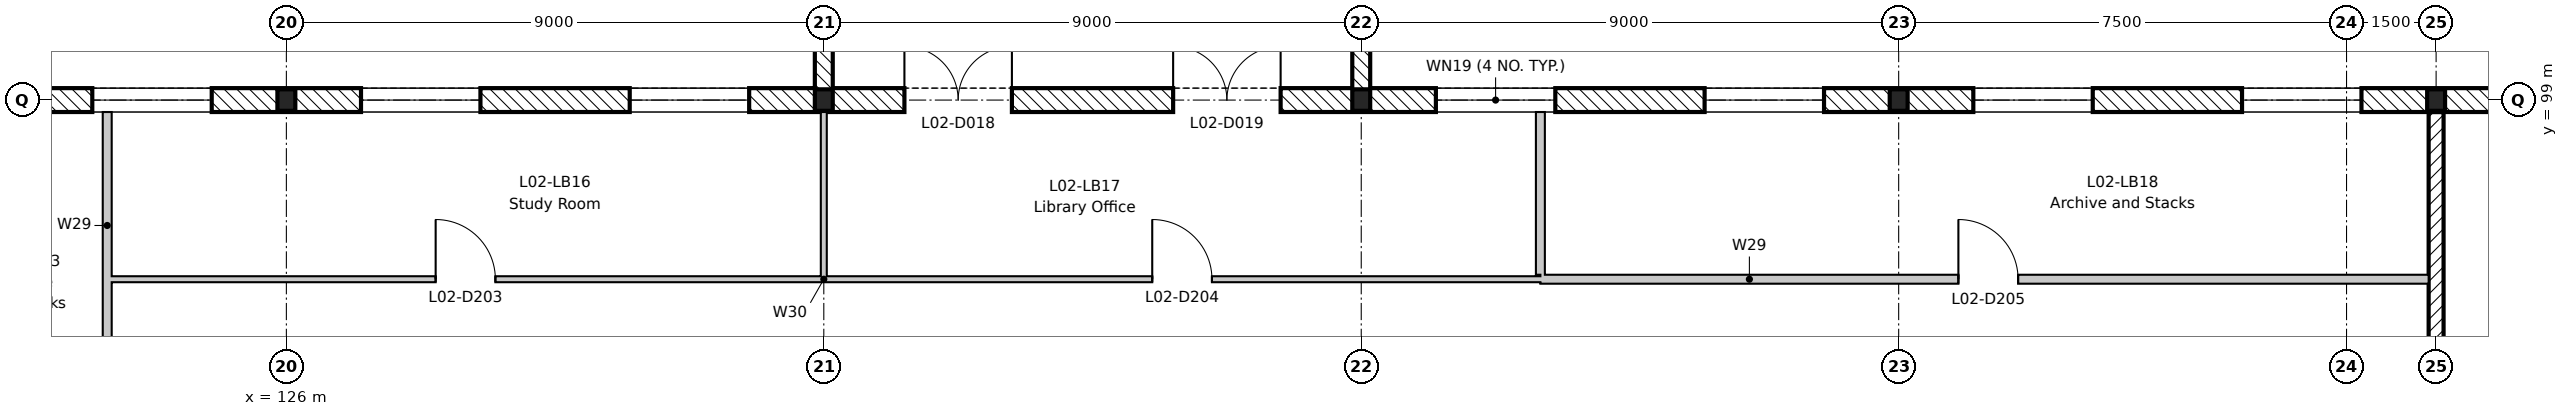
"""IFC4 building model, lengths in metres.
Left out: names, types, materials, properties, quantities, classifications, styles, units other than length and angle.
Written with IfcOpenShell. Run it as: python <this file> out.ifc"""

import sys

from ifc_helpers import new_model, si_unit, direction, frame, frame_2d, origin, origin_2d, place, context, subcontext, project, spatial, rectangle, i_section, extrude, element, fill, save


model = new_model("IFC4")
c1 = context("Model", 3, precision=1e-05, world=origin(), true_north=direction((0.0, 1.0)))
c2 = subcontext(c1, "Body", "Model", "MODEL_VIEW")
j1 = project(units=[si_unit("LENGTHUNIT", "METRE"), si_unit("PLANEANGLEUNIT", "RADIAN")], contexts=[c1])
p1 = place(None, origin())
s1 = spatial("IfcSite", under=j1, at=p1, CompositionType="ELEMENT")
p2 = place(p1, origin())
s2 = spatial("IfcBuilding", under=s1, at=p2, CompositionType="ELEMENT")
p3 = place(p2, frame((0.0, 0.0, 9.9)))
s3 = spatial("IfcBuildingStorey", under=s2, at=p3, CompositionType="ELEMENT", Elevation=9.9)
for number, where, z_axis, x_axis in (
    (1, (126.0, 99.0, -0.2), (0.0, 0.0, 1.0), (1.0, 0.0, 0.0)),
    (2, (135.0, 99.0, -0.2), (0.0, 0.0, 1.0), (1.0, 0.0, 0.0)),
    (3, (144.0, 99.0, -0.2), (0.0, 0.0, 1.0), (1.0, 0.0, 0.0)),
    (4, (153.0, 99.0, -0.2), (0.0, 0.0, 1.0), (1.0, 0.0, 0.0)),
    (5, (162.0, 99.0, -0.2), (0.0, 0.0, 1.0), (1.0, 0.0, 0.0)),
):
    element("IfcColumn", number, at=place(p3, frame(where, z_axis=z_axis, x_axis=x_axis)), inside=s3, PredefinedType="COLUMN", context=c2, shape_type="SweptSolid", body=[
        extrude(i_section(OverallWidth=0.3, OverallDepth=0.36, WebThickness=0.012, FlangeThickness=0.022, FilletRadius=0.027, at=origin_2d()), origin(), (0.0, 0.0, 1.0), 4.45),
    ])
p4 = place(p3, frame((162.0, 98.8, 0.0), z_axis=(0.0, 0.0, 1.0), x_axis=(0.0, -1.0, 0.0)))
e6 = element("IfcWall", 6, at=p4, inside=s3, PredefinedType="SHEAR", context=c2, shape_type="SweptSolid", body=[
    extrude(rectangle(XDim=8.65, YDim=0.25, at=frame_2d((4.325, 0.0))), origin(), (0.0, 0.0, 1.0), 4.25),
])
p5 = place(p4, frame((6.7, 0.0, 0.0)))
e7 = element("IfcOpeningElement", 7, at=p5, cuts=e6, PredefinedType="OPENING", context=c2, shape_type="SweptSolid", body=[
    extrude(rectangle(XDim=1.2, YDim=2.1, at=frame_2d((0.6, 1.05))), frame((0.0, 0.135, 0.0), z_axis=(0.0, -1.0, 0.0), x_axis=(1.0, 0.0, 0.0)), (0.0, 0.0, 1.0), 0.27),
])
for number, where, z_axis, x_axis in (
    (8, (135.0, 99.18, 0.0), (0.0, 0.0, 1.0), (0.0, 1.0, 0.0)),
    (9, (144.0, 99.18, 0.0), (0.0, 0.0, 1.0), (0.0, 1.0, 0.0)),
):
    element("IfcWall", number, at=place(p3, frame(where, z_axis=z_axis, x_axis=x_axis)), inside=s3, PredefinedType="STANDARD", context=c2, shape_type="SweptSolid", body=[
        extrude(rectangle(XDim=2.82, YDim=0.3, at=frame_2d((1.41, 0.0))), origin(), (0.0, 0.0, 1.0), 3.97),
    ])
p6 = place(p3, frame((116.8, 99.0, 0.0), z_axis=(0.0, 0.0, 1.0), x_axis=(1.0, 0.0, 0.0)))
e10 = element("IfcWall", 10, at=p6, inside=s3, PredefinedType="STANDARD", context=c2, shape_type="SweptSolid", body=[
    extrude(rectangle(XDim=54.4, YDim=0.4, at=frame_2d((27.2, 0.0))), origin(), (0.0, 0.0, 1.0), 4.25),
])
p7 = place(p6, frame((1.45, 0.0, 0.5)))
e11 = element("IfcOpeningElement", 11, at=p7, cuts=e10, PredefinedType="OPENING", context=c2, shape_type="SweptSolid", body=[
    extrude(rectangle(XDim=2.0, YDim=3.2, at=frame_2d((1.0, 1.6))), frame((0.0, 0.21, 0.0), z_axis=(0.0, -1.0, 0.0), x_axis=(1.0, 0.0, 0.0)), (0.0, 0.0, 1.0), 0.42),
])
p8 = place(p6, frame((5.95, 0.0, 0.5)))
e12 = element("IfcOpeningElement", 12, at=p8, cuts=e10, PredefinedType="OPENING", context=c2, shape_type="SweptSolid", body=[
    extrude(rectangle(XDim=2.0, YDim=3.2, at=frame_2d((1.0, 1.6))), frame((0.0, 0.21, 0.0), z_axis=(0.0, -1.0, 0.0), x_axis=(1.0, 0.0, 0.0)), (0.0, 0.0, 1.0), 0.42),
])
p9 = place(p6, frame((10.45, 0.0, 0.5)))
e13 = element("IfcOpeningElement", 13, at=p9, cuts=e10, PredefinedType="OPENING", context=c2, shape_type="SweptSolid", body=[
    extrude(rectangle(XDim=2.0, YDim=3.2, at=frame_2d((1.0, 1.6))), frame((0.0, 0.21, 0.0), z_axis=(0.0, -1.0, 0.0), x_axis=(1.0, 0.0, 0.0)), (0.0, 0.0, 1.0), 0.42),
])
p10 = place(p6, frame((14.95, 0.0, 0.5)))
e14 = element("IfcOpeningElement", 14, at=p10, cuts=e10, PredefinedType="OPENING", context=c2, shape_type="SweptSolid", body=[
    extrude(rectangle(XDim=2.0, YDim=3.2, at=frame_2d((1.0, 1.6))), frame((0.0, 0.21, 0.0), z_axis=(0.0, -1.0, 0.0), x_axis=(1.0, 0.0, 0.0)), (0.0, 0.0, 1.0), 0.42),
])
p11 = place(p6, frame((28.45, 0.0, 0.5)))
e15 = element("IfcOpeningElement", 15, at=p11, cuts=e10, PredefinedType="OPENING", context=c2, shape_type="SweptSolid", body=[
    extrude(rectangle(XDim=2.0, YDim=3.2, at=frame_2d((1.0, 1.6))), frame((0.0, 0.21, 0.0), z_axis=(0.0, -1.0, 0.0), x_axis=(1.0, 0.0, 0.0)), (0.0, 0.0, 1.0), 0.42),
])
p12 = place(p6, frame((32.95, 0.0, 0.5)))
e16 = element("IfcOpeningElement", 16, at=p12, cuts=e10, PredefinedType="OPENING", context=c2, shape_type="SweptSolid", body=[
    extrude(rectangle(XDim=2.0, YDim=3.2, at=frame_2d((1.0, 1.6))), frame((0.0, 0.21, 0.0), z_axis=(0.0, -1.0, 0.0), x_axis=(1.0, 0.0, 0.0)), (0.0, 0.0, 1.0), 0.42),
])
p13 = place(p6, frame((37.45, 0.0, 0.5)))
e17 = element("IfcOpeningElement", 17, at=p13, cuts=e10, PredefinedType="OPENING", context=c2, shape_type="SweptSolid", body=[
    extrude(rectangle(XDim=2.0, YDim=3.2, at=frame_2d((1.0, 1.6))), frame((0.0, 0.21, 0.0), z_axis=(0.0, -1.0, 0.0), x_axis=(1.0, 0.0, 0.0)), (0.0, 0.0, 1.0), 0.42),
])
p14 = place(p6, frame((41.95, 0.0, 0.5)))
e18 = element("IfcOpeningElement", 18, at=p14, cuts=e10, PredefinedType="OPENING", context=c2, shape_type="SweptSolid", body=[
    extrude(rectangle(XDim=2.0, YDim=3.2, at=frame_2d((1.0, 1.6))), frame((0.0, 0.21, 0.0), z_axis=(0.0, -1.0, 0.0), x_axis=(1.0, 0.0, 0.0)), (0.0, 0.0, 1.0), 0.42),
])
p15 = place(p6, frame((19.55, 0.0, 0.0)))
e19 = element("IfcOpeningElement", 19, at=p15, cuts=e10, PredefinedType="OPENING", context=c2, shape_type="SweptSolid", body=[
    extrude(rectangle(XDim=1.8, YDim=2.4, at=frame_2d((0.9, 1.2))), frame((0.0, 0.21, 0.0), z_axis=(0.0, -1.0, 0.0), x_axis=(1.0, 0.0, 0.0)), (0.0, 0.0, 1.0), 0.42),
])
p16 = place(p6, frame((24.05, 0.0, 0.0)))
e20 = element("IfcOpeningElement", 20, at=p16, cuts=e10, PredefinedType="OPENING", context=c2, shape_type="SweptSolid", body=[
    extrude(rectangle(XDim=1.8, YDim=2.4, at=frame_2d((0.9, 1.2))), frame((0.0, 0.21, 0.0), z_axis=(0.0, -1.0, 0.0), x_axis=(1.0, 0.0, 0.0)), (0.0, 0.0, 1.0), 0.42),
])
p17 = place(p3, frame((147.0, 96.0, 0.0), z_axis=(0.0, 0.0, 1.0), x_axis=(1.0, 0.0, 0.0)))
e21 = element("IfcWall", 21, at=p17, inside=s3, PredefinedType="PARTITIONING", context=c2, shape_type="SweptSolid", body=[
    extrude(rectangle(XDim=14.875, YDim=0.15, at=frame_2d((7.438, 0.0))), origin(), (0.0, 0.0, 1.0), 4.25),
])
p18 = place(p17, frame((7.0, 0.0, 0.0)))
e22 = element("IfcOpeningElement", 22, at=p18, cuts=e21, PredefinedType="OPENING", context=c2, shape_type="SweptSolid", body=[
    extrude(rectangle(XDim=1.0, YDim=2.1, at=frame_2d((0.5, 1.05))), frame((0.0, 0.085, 0.0), z_axis=(0.0, -1.0, 0.0), x_axis=(1.0, 0.0, 0.0)), (0.0, 0.0, 1.0), 0.17),
])
p19 = place(p3, frame((123.075, 96.0, 0.0), z_axis=(0.0, 0.0, 1.0), x_axis=(1.0, 0.0, 0.0)))
e23 = element("IfcWall", 23, at=p19, inside=s3, PredefinedType="PARTITIONING", context=c2, shape_type="SweptSolid", body=[
    extrude(rectangle(XDim=23.925, YDim=0.1, at=frame_2d((11.962, 0.0))), origin(), (0.0, 0.0, 1.0), 4.25),
])
p20 = place(p19, frame((5.425, 0.0, 0.0)))
e24 = element("IfcOpeningElement", 24, at=p20, cuts=e23, PredefinedType="OPENING", context=c2, shape_type="SweptSolid", body=[
    extrude(rectangle(XDim=1.0, YDim=2.1, at=frame_2d((0.5, 1.05))), frame((0.0, 0.06, 0.0), z_axis=(0.0, -1.0, 0.0), x_axis=(1.0, 0.0, 0.0)), (0.0, 0.0, 1.0), 0.12),
])
p21 = place(p19, frame((17.425, 0.0, 0.0)))
e25 = element("IfcOpeningElement", 25, at=p21, cuts=e23, PredefinedType="OPENING", context=c2, shape_type="SweptSolid", body=[
    extrude(rectangle(XDim=1.0, YDim=2.1, at=frame_2d((0.5, 1.05))), frame((0.0, 0.06, 0.0), z_axis=(0.0, -1.0, 0.0), x_axis=(1.0, 0.0, 0.0)), (0.0, 0.0, 1.0), 0.12),
])
p22 = place(p3, frame((123.0, 90.075, 0.0), z_axis=(0.0, 0.0, 1.0), x_axis=(0.0, 1.0, 0.0)))
e26 = element("IfcWall", 26, at=p22, inside=s3, PredefinedType="PARTITIONING", context=c2, shape_type="SweptSolid", body=[
    extrude(rectangle(XDim=8.725, YDim=0.15, at=frame_2d((4.363, 0.0))), origin(), (0.0, 0.0, 1.0), 4.25),
])
p23 = place(p22, frame((0.825, 0.0, 0.0)))
e27 = element("IfcOpeningElement", 27, at=p23, cuts=e26, PredefinedType="OPENING", context=c2, shape_type="SweptSolid", body=[
    extrude(rectangle(XDim=1.2, YDim=2.1, at=frame_2d((0.6, 1.05))), frame((0.0, 0.085, 0.0), z_axis=(0.0, -1.0, 0.0), x_axis=(1.0, 0.0, 0.0)), (0.0, 0.0, 1.0), 0.17),
])
p24 = place(p22, frame((3.925, 0.0, 0.0)))
e28 = element("IfcOpeningElement", 28, at=p24, cuts=e26, PredefinedType="OPENING", context=c2, shape_type="SweptSolid", body=[
    extrude(rectangle(XDim=1.0, YDim=2.1, at=frame_2d((0.5, 1.05))), frame((0.0, 0.085, 0.0), z_axis=(0.0, -1.0, 0.0), x_axis=(1.0, 0.0, 0.0)), (0.0, 0.0, 1.0), 0.17),
])
p25 = place(p3, frame((135.0, 96.05, 0.0), z_axis=(0.0, 0.0, 1.0), x_axis=(0.0, 1.0, 0.0)))
e29 = element("IfcWall", 29, at=p25, inside=s3, PredefinedType="PARTITIONING", context=c2, shape_type="SweptSolid", body=[
    extrude(rectangle(XDim=2.75, YDim=0.1, at=frame_2d((1.375, 0.0))), origin(), (0.0, 0.0, 1.0), 4.25),
])
p26 = place(p3, frame((147.0, 96.075, 0.0), z_axis=(0.0, 0.0, 1.0), x_axis=(0.0, 1.0, 0.0)))
e30 = element("IfcWall", 30, at=p26, inside=s3, PredefinedType="PARTITIONING", context=c2, shape_type="SweptSolid", body=[
    extrude(rectangle(XDim=2.725, YDim=0.15, at=frame_2d((1.363, 0.0))), origin(), (0.0, 0.0, 1.0), 4.25),
])
p27 = place(p8, origin())
e31 = element("IfcWindow", 31, at=p27, inside=s3, PartitioningType="SINGLE_PANEL", PredefinedType="WINDOW", context=c2, shape_type="SweptSolid", body=[
    extrude(rectangle(XDim=2.0, YDim=3.2, at=frame_2d((1.0, 1.6))), frame((0.0, 0.03, 0.0), z_axis=(0.0, -1.0, 0.0), x_axis=(1.0, 0.0, 0.0)), (0.0, 0.0, 1.0), 0.06),
])
fill(e12, e31)
p28 = place(p9, origin())
e32 = element("IfcWindow", 32, at=p28, inside=s3, PartitioningType="SINGLE_PANEL", PredefinedType="WINDOW", context=c2, shape_type="SweptSolid", body=[
    extrude(rectangle(XDim=2.0, YDim=3.2, at=frame_2d((1.0, 1.6))), frame((0.0, 0.03, 0.0), z_axis=(0.0, -1.0, 0.0), x_axis=(1.0, 0.0, 0.0)), (0.0, 0.0, 1.0), 0.06),
])
fill(e13, e32)
p29 = place(p10, origin())
e33 = element("IfcWindow", 33, at=p29, inside=s3, PartitioningType="SINGLE_PANEL", PredefinedType="WINDOW", context=c2, shape_type="SweptSolid", body=[
    extrude(rectangle(XDim=2.0, YDim=3.2, at=frame_2d((1.0, 1.6))), frame((0.0, 0.03, 0.0), z_axis=(0.0, -1.0, 0.0), x_axis=(1.0, 0.0, 0.0)), (0.0, 0.0, 1.0), 0.06),
])
fill(e14, e33)
p30 = place(p11, origin())
e34 = element("IfcWindow", 34, at=p30, inside=s3, PartitioningType="SINGLE_PANEL", PredefinedType="WINDOW", context=c2, shape_type="SweptSolid", body=[
    extrude(rectangle(XDim=2.0, YDim=3.2, at=frame_2d((1.0, 1.6))), frame((0.0, 0.03, 0.0), z_axis=(0.0, -1.0, 0.0), x_axis=(1.0, 0.0, 0.0)), (0.0, 0.0, 1.0), 0.06),
])
fill(e15, e34)
p31 = place(p12, origin())
e35 = element("IfcWindow", 35, at=p31, inside=s3, PartitioningType="SINGLE_PANEL", PredefinedType="WINDOW", context=c2, shape_type="SweptSolid", body=[
    extrude(rectangle(XDim=2.0, YDim=3.2, at=frame_2d((1.0, 1.6))), frame((0.0, 0.03, 0.0), z_axis=(0.0, -1.0, 0.0), x_axis=(1.0, 0.0, 0.0)), (0.0, 0.0, 1.0), 0.06),
])
fill(e16, e35)
p32 = place(p13, origin())
e36 = element("IfcWindow", 36, at=p32, inside=s3, PartitioningType="SINGLE_PANEL", PredefinedType="WINDOW", context=c2, shape_type="SweptSolid", body=[
    extrude(rectangle(XDim=2.0, YDim=3.2, at=frame_2d((1.0, 1.6))), frame((0.0, 0.03, 0.0), z_axis=(0.0, -1.0, 0.0), x_axis=(1.0, 0.0, 0.0)), (0.0, 0.0, 1.0), 0.06),
])
fill(e17, e36)
p33 = place(p14, origin())
e37 = element("IfcWindow", 37, at=p33, inside=s3, PartitioningType="SINGLE_PANEL", PredefinedType="WINDOW", context=c2, shape_type="SweptSolid", body=[
    extrude(rectangle(XDim=2.0, YDim=3.2, at=frame_2d((1.0, 1.6))), frame((0.0, 0.03, 0.0), z_axis=(0.0, -1.0, 0.0), x_axis=(1.0, 0.0, 0.0)), (0.0, 0.0, 1.0), 0.06),
])
fill(e18, e37)
p34 = place(p15, origin())
e38 = element("IfcDoor", 38, at=p34, inside=s3, OperationType="DOUBLE_DOOR_SINGLE_SWING", PredefinedType="DOOR", context=c2, shape_type="SweptSolid", body=[
    extrude(rectangle(XDim=1.8, YDim=2.4, at=frame_2d((0.9, 1.2))), frame((0.0, 0.025, 0.0), z_axis=(0.0, -1.0, 0.0), x_axis=(1.0, 0.0, 0.0)), (0.0, 0.0, 1.0), 0.05),
])
fill(e19, e38)
p35 = place(p16, origin())
e39 = element("IfcDoor", 39, at=p35, inside=s3, OperationType="DOUBLE_DOOR_SINGLE_SWING", PredefinedType="DOOR", context=c2, shape_type="SweptSolid", body=[
    extrude(rectangle(XDim=1.8, YDim=2.4, at=frame_2d((0.9, 1.2))), frame((0.0, 0.025, 0.0), z_axis=(0.0, -1.0, 0.0), x_axis=(1.0, 0.0, 0.0)), (0.0, 0.0, 1.0), 0.05),
])
fill(e20, e39)
p36 = place(p20, origin())
e40 = element("IfcDoor", 40, at=p36, inside=s3, OperationType="SINGLE_SWING_LEFT", PredefinedType="DOOR", context=c2, shape_type="SweptSolid", body=[
    extrude(rectangle(XDim=1.0, YDim=2.1, at=frame_2d((0.5, 1.05))), frame((0.0, 0.025, 0.0), z_axis=(0.0, -1.0, 0.0), x_axis=(1.0, 0.0, 0.0)), (0.0, 0.0, 1.0), 0.05),
])
fill(e24, e40)
p37 = place(p21, origin())
e41 = element("IfcDoor", 41, at=p37, inside=s3, OperationType="SINGLE_SWING_LEFT", PredefinedType="DOOR", context=c2, shape_type="SweptSolid", body=[
    extrude(rectangle(XDim=1.0, YDim=2.1, at=frame_2d((0.5, 1.05))), frame((0.0, 0.025, 0.0), z_axis=(0.0, -1.0, 0.0), x_axis=(1.0, 0.0, 0.0)), (0.0, 0.0, 1.0), 0.05),
])
fill(e25, e41)
p38 = place(p18, origin())
e42 = element("IfcDoor", 42, at=p38, inside=s3, OperationType="SINGLE_SWING_LEFT", PredefinedType="DOOR", context=c2, shape_type="SweptSolid", body=[
    extrude(rectangle(XDim=1.0, YDim=2.1, at=frame_2d((0.5, 1.05))), frame((0.0, 0.025, 0.0), z_axis=(0.0, -1.0, 0.0), x_axis=(1.0, 0.0, 0.0)), (0.0, 0.0, 1.0), 0.05),
])
fill(e22, e42)
save(model, sys.argv[1])
